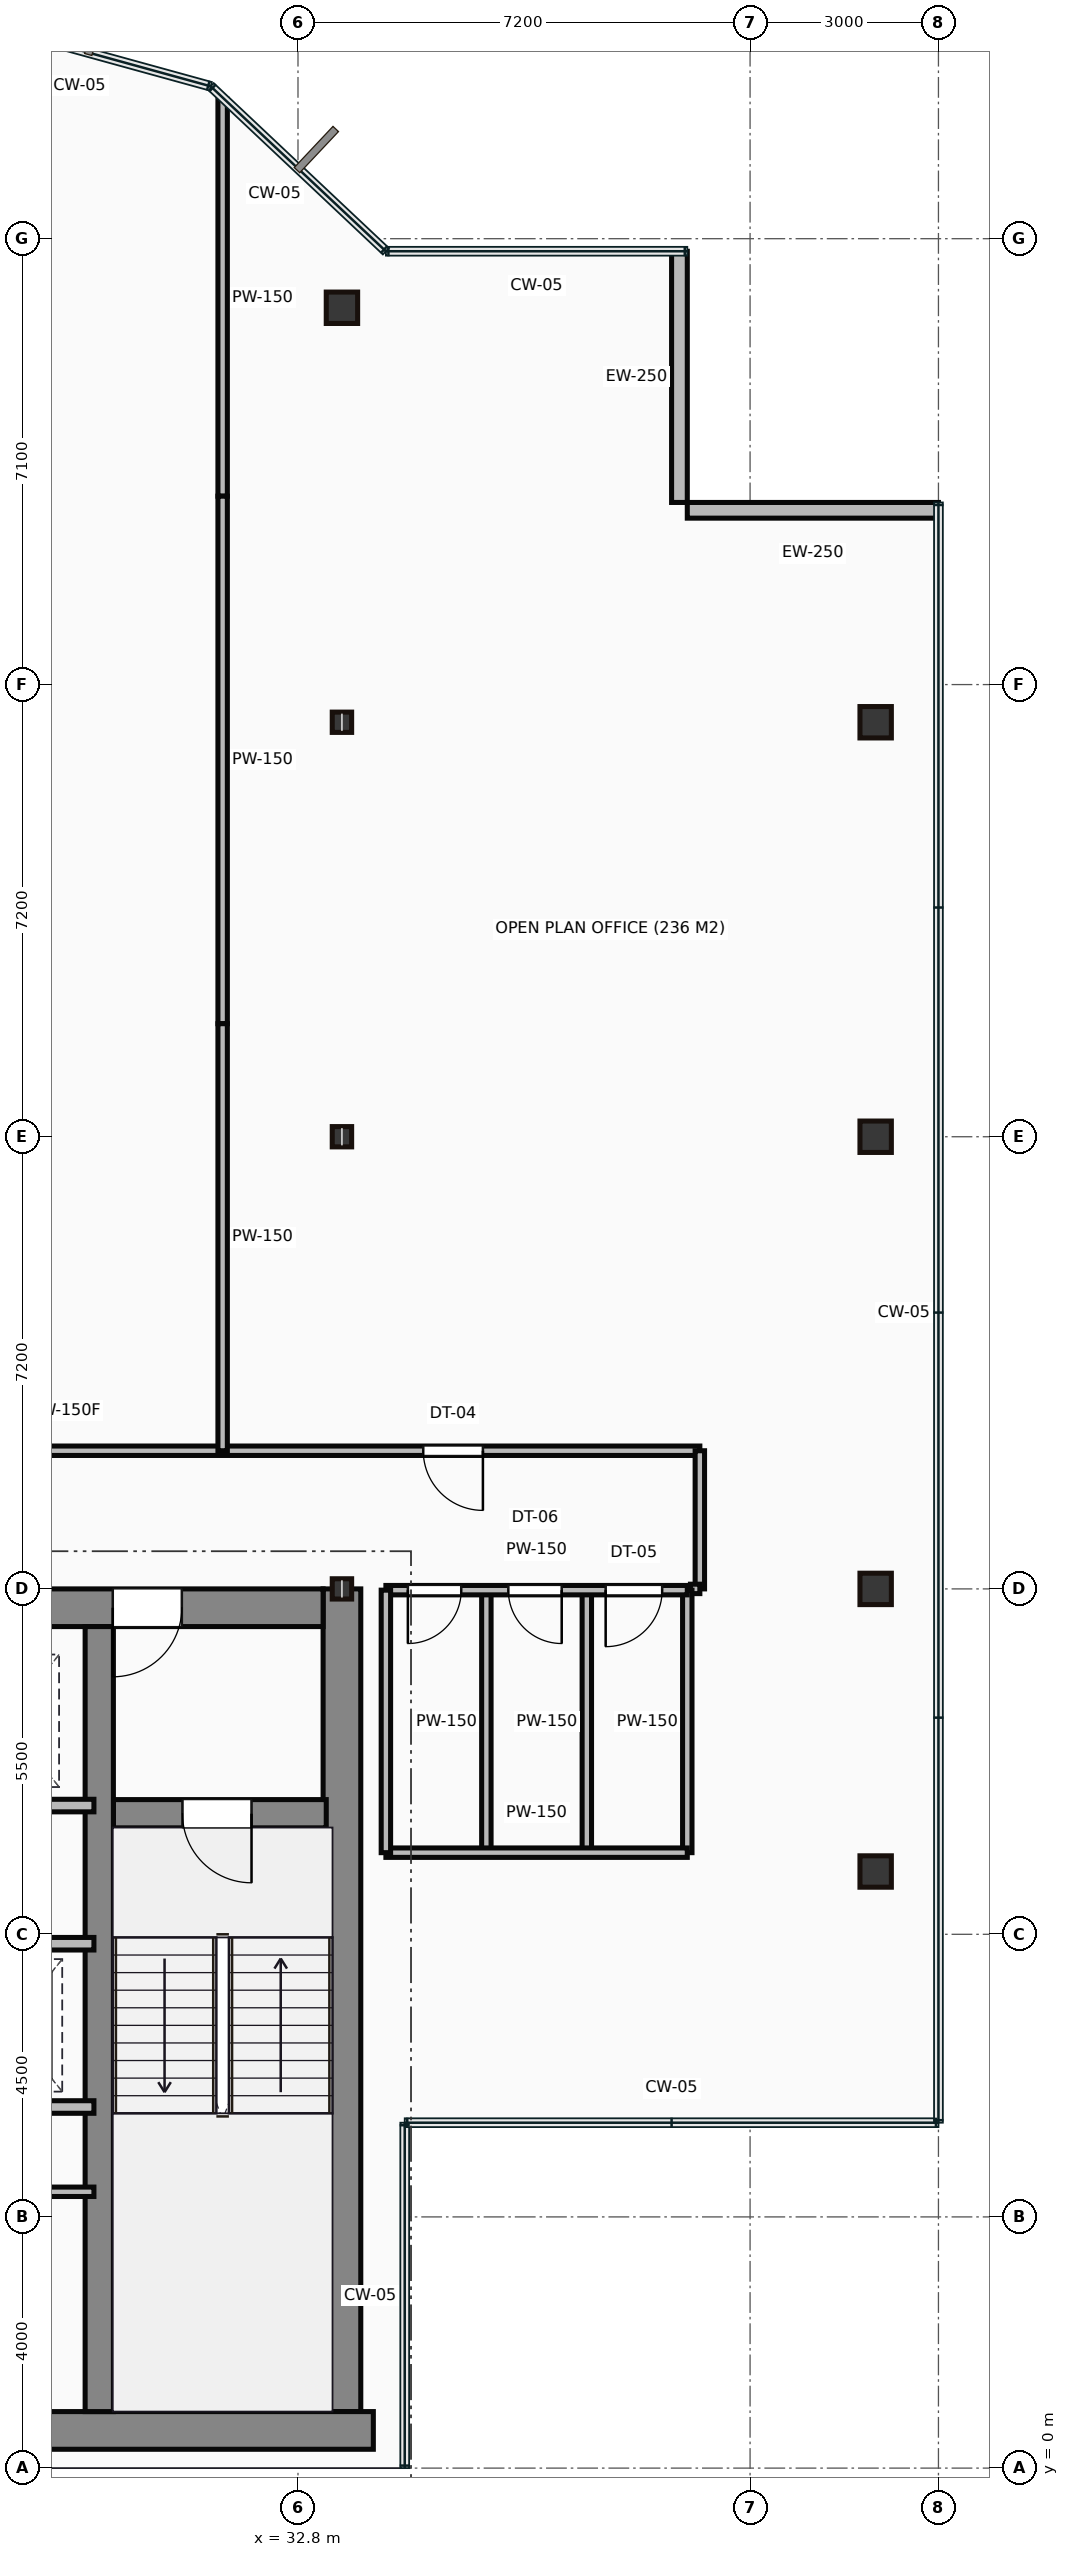
"""IFC4 building model, lengths in metres.
Left out: names, types, materials, properties, quantities, classifications, styles, units other than length and angle.
Written with IfcOpenShell. Run it as: python <this file> out.ifc"""

import sys

from ifc_helpers import new_model, si_unit, direction, frame, frame_2d, origin, origin_2d, place, context, subcontext, project, spatial, rectangle, hollow_rectangle, i_section, extrude, source, transform, mapped, element, fill, save


model = new_model("IFC4")
c1 = context("Model", 3, precision=1e-05, world=origin(), true_north=direction((0.0, 1.0)))
c2 = subcontext(c1, "Body", "Model", "MODEL_VIEW")
j1 = project(units=[si_unit("LENGTHUNIT", "METRE"), si_unit("PLANEANGLEUNIT", "RADIAN")], contexts=[c1])
p1 = place(None, origin())
s1 = spatial("IfcSite", under=j1, at=p1, CompositionType="ELEMENT")
p2 = place(p1, origin())
s2 = spatial("IfcBuilding", under=s1, at=p2, CompositionType="ELEMENT")
p3 = place(p2, frame((0.0, 0.0, 228.75)))
s3 = spatial("IfcBuildingStorey", under=s2, at=p3, CompositionType="ELEMENT", Elevation=228.75)
m1 = source(origin(), c2, "Body", "SweptSolid", [
    extrude(rectangle(XDim=29.5, YDim=0.6, at=frame_2d((14.75, 0.0))), origin(), (0.0, 0.0, 1.0), 3.65),
])
p4 = place(p3, frame((4.5, 0.6, 0.0), z_axis=(0.0, 0.0, 1.0), x_axis=(1.0, 0.0, 0.0)))
e1 = element("IfcWall", 1, at=p4, inside=s3, PredefinedType="SHEAR", context=c2, shape_type="MappedRepresentation", body=[
    mapped(m1, transform((0.0, 0.0, 0.0))),
])
m2 = source(origin(), c2, "Body", "SweptSolid", [
    extrude(rectangle(XDim=13.1, YDim=0.6, at=frame_2d((6.55, 0.0))), origin(), (0.0, 0.0, 1.0), 3.65),
])
p5 = place(p3, frame((33.5, 0.9, 0.0), z_axis=(0.0, 0.0, 1.0), x_axis=(0.0, 1.0, 0.0)))
e2 = element("IfcWall", 2, at=p5, inside=s3, PredefinedType="SHEAR", context=c2, shape_type="MappedRepresentation", body=[
    mapped(m2, transform((0.0, 0.0, 0.0))),
])
m3 = source(origin(), c2, "Body", "SweptSolid", [
    extrude(rectangle(XDim=12.6, YDim=0.6, at=frame_2d((6.3, 0.0))), origin(), (0.0, 0.0, 1.0), 3.65),
])
p6 = place(p3, frame((20.6, 13.7, 0.0), z_axis=(0.0, 0.0, 1.0), x_axis=(1.0, 0.0, 0.0)))
e3 = element("IfcWall", 3, at=p6, inside=s3, PredefinedType="SHEAR", context=c2, shape_type="MappedRepresentation", body=[
    mapped(m3, transform((0.0, 0.0, 0.0))),
])
p7 = place(p6, frame((9.25, 0.0, 0.0)))
e4 = element("IfcOpeningElement", 4, at=p7, cuts=e3, PredefinedType="OPENING", context=c2, shape_type="SweptSolid", body=[
    extrude(rectangle(XDim=1.1, YDim=2.15, at=frame_2d((0.55, 1.075))), frame((0.0, 0.31, 0.0), z_axis=(0.0, -1.0, 0.0), x_axis=(1.0, 0.0, 0.0)), (0.0, 0.0, 1.0), 0.62),
])
m4 = source(origin(), c2, "Body", "SweptSolid", [
    extrude(rectangle(XDim=12.5, YDim=0.45, at=frame_2d((6.25, 0.0))), origin(), (0.0, 0.0, 1.0), 3.65),
])
p8 = place(p3, frame((29.635, 0.9, 0.0), z_axis=(0.0, 0.0, 1.0), x_axis=(0.0, 1.0, 0.0)))
e5 = element("IfcWall", 5, at=p8, inside=s3, PredefinedType="SHEAR", context=c2, shape_type="MappedRepresentation", body=[
    mapped(m4, transform((0.0, 0.0, 0.0))),
])
m5 = source(origin(), c2, "Body", "SweptSolid", [
    extrude(rectangle(XDim=3.39, YDim=0.45, at=frame_2d((1.695, 0.0))), origin(), (0.0, 0.0, 1.0), 3.65),
])
p9 = place(p3, frame((29.86, 10.42, 0.0), z_axis=(0.0, 0.0, 1.0), x_axis=(1.0, 0.0, 0.0)))
e6 = element("IfcWall", 6, at=p9, inside=s3, PredefinedType="SHEAR", context=c2, shape_type="MappedRepresentation", body=[
    mapped(m5, transform((0.0, 0.0, 0.0))),
])
p10 = place(p9, frame((1.1, 0.0, 0.0)))
e7 = element("IfcOpeningElement", 7, at=p10, cuts=e6, PredefinedType="OPENING", context=c2, shape_type="SweptSolid", body=[
    extrude(rectangle(XDim=1.1, YDim=2.15, at=frame_2d((0.55, 1.075))), frame((0.0, 0.235, 0.0), z_axis=(0.0, -1.0, 0.0), x_axis=(1.0, 0.0, 0.0)), (0.0, 0.0, 1.0), 0.47),
])
m6 = source(origin(), c2, "Body", "SweptSolid", [
    extrude(i_section(OverallWidth=0.309, OverallDepth=0.323, WebThickness=0.014, FlangeThickness=0.023, at=origin_2d()), origin(), (0.0, 0.0, 1.0), 3.65),
])
for number, where, z_axis, x_axis in (
    (8, (33.5, 14.0, 0.0), (0.0, 0.0, 1.0), (1.0, 0.0, 0.0)),
    (9, (33.5, 21.2, 0.0), (0.0, 0.0, 1.0), (1.0, 0.0, 0.0)),
    (10, (33.5, 27.8, 0.0), (0.0, 0.0, 1.0), (1.0, 0.0, 0.0)),
):
    element("IfcColumn", number, at=place(p3, frame(where, z_axis=z_axis, x_axis=x_axis)), inside=s3, PredefinedType="COLUMN", context=c2, shape_type="MappedRepresentation", body=[
        mapped(m6, transform((0.0, 0.0, 0.0))),
    ])
m7 = source(origin(), c2, "Body", "SweptSolid", [
    extrude(hollow_rectangle(XDim=0.5, YDim=0.5, WallThickness=0.022, at=origin_2d()), origin(), (0.0, 0.0, 1.0), 3.65),
])
for number, where, z_axis, x_axis in (
    (11, (33.5, 34.4, 0.0), (0.0, 0.0, 1.0), (1.0, 0.0, 0.0)),
    (12, (42.0, 9.5, 0.0), (0.0, 0.0, 1.0), (1.0, 0.0, 0.0)),
    (13, (42.0, 14.0, 0.0), (0.0, 0.0, 1.0), (1.0, 0.0, 0.0)),
    (14, (42.0, 21.2, 0.0), (0.0, 0.0, 1.0), (1.0, 0.0, 0.0)),
    (15, (42.0, 27.8, 0.0), (0.0, 0.0, 1.0), (1.0, 0.0, 0.0)),
):
    element("IfcColumn", number, at=place(p3, frame(where, z_axis=z_axis, x_axis=x_axis)), inside=s3, PredefinedType="COLUMN", context=c2, shape_type="MappedRepresentation", body=[
        mapped(m7, transform((0.0, 0.0, 0.0))),
    ])
m8 = source(origin(), c2, "Body", "SweptSolid", [
    extrude(rectangle(XDim=4.0, YDim=0.25, at=frame_2d((2.0, 0.0))), origin(), (0.0, 0.0, 1.0), 3.4),
])
for number, where, z_axis, x_axis in (
    (16, (43.0, 31.175, 0.0), (0.0, 0.0, 1.0), (-1.0, 0.0, 0.0)),
    (17, (38.875, 31.3, 0.0), (0.0, 0.0, 1.0), (0.0, 1.0, 0.0)),
):
    element("IfcWall", number, at=place(p3, frame(where, z_axis=z_axis, x_axis=x_axis)), inside=s3, PredefinedType="STANDARD", context=c2, shape_type="MappedRepresentation", body=[
        mapped(m8, transform((0.0, 0.0, 0.0))),
    ])
m9 = source(origin(), c2, "Body", "SweptSolid", [
    extrude(rectangle(XDim=8.8, YDim=0.2, at=frame_2d((4.4, 0.0))), origin(), (0.0, 0.0, 1.0), 3.4),
])
p11 = place(p3, frame((20.75, 10.55, 0.0), z_axis=(0.0, 0.0, 1.0), x_axis=(1.0, 0.0, 0.0)))
e18 = element("IfcWall", 18, at=p11, inside=s3, PredefinedType="PARTITIONING", context=c2, shape_type="MappedRepresentation", body=[
    mapped(m9, transform((0.0, 0.0, 0.0))),
])
p12 = place(p11, frame((0.5, 0.0, 0.0)))
e19 = element("IfcOpeningElement", 19, at=p12, cuts=e18, PredefinedType="OPENING", context=c2, shape_type="SweptSolid", body=[
    extrude(rectangle(XDim=1.05, YDim=2.15, at=frame_2d((0.525, 1.075))), frame((0.0, 0.11, 0.0), z_axis=(0.0, -1.0, 0.0), x_axis=(1.0, 0.0, 0.0)), (0.0, 0.0, 1.0), 0.22),
])
p13 = place(p11, frame((2.6, 0.0, 0.0)))
e20 = element("IfcOpeningElement", 20, at=p13, cuts=e18, PredefinedType="OPENING", context=c2, shape_type="SweptSolid", body=[
    extrude(rectangle(XDim=1.05, YDim=2.15, at=frame_2d((0.525, 1.075))), frame((0.0, 0.11, 0.0), z_axis=(0.0, -1.0, 0.0), x_axis=(1.0, 0.0, 0.0)), (0.0, 0.0, 1.0), 0.22),
])
p14 = place(p11, frame((4.7, 0.0, 0.0)))
e21 = element("IfcOpeningElement", 21, at=p14, cuts=e18, PredefinedType="OPENING", context=c2, shape_type="SweptSolid", body=[
    extrude(rectangle(XDim=1.05, YDim=2.15, at=frame_2d((0.525, 1.075))), frame((0.0, 0.11, 0.0), z_axis=(0.0, -1.0, 0.0), x_axis=(1.0, 0.0, 0.0)), (0.0, 0.0, 1.0), 0.22),
])
p15 = place(p11, frame((6.8, 0.0, 0.0)))
e22 = element("IfcOpeningElement", 22, at=p15, cuts=e18, PredefinedType="OPENING", context=c2, shape_type="SweptSolid", body=[
    extrude(rectangle(XDim=1.05, YDim=2.15, at=frame_2d((0.525, 1.075))), frame((0.0, 0.11, 0.0), z_axis=(0.0, -1.0, 0.0), x_axis=(1.0, 0.0, 0.0)), (0.0, 0.0, 1.0), 0.22),
])
m10 = source(origin(), c2, "Body", "SweptSolid", [
    extrude(rectangle(XDim=4.55, YDim=0.2, at=frame_2d((2.275, 0.0))), origin(), (0.0, 0.0, 1.0), 3.4),
])
p16 = place(p3, frame((25.0, 8.35, 0.0), z_axis=(0.0, 0.0, 1.0), x_axis=(1.0, 0.0, 0.0)))
e23 = element("IfcWall", 23, at=p16, inside=s3, PredefinedType="PARTITIONING", context=c2, shape_type="MappedRepresentation", body=[
    mapped(m10, transform((0.0, 0.0, 0.0))),
])
p17 = place(p16, frame((0.5, 0.0, 0.0)))
e24 = element("IfcOpeningElement", 24, at=p17, cuts=e23, PredefinedType="OPENING", context=c2, shape_type="SweptSolid", body=[
    extrude(rectangle(XDim=1.05, YDim=2.15, at=frame_2d((0.525, 1.075))), frame((0.0, 0.11, 0.0), z_axis=(0.0, -1.0, 0.0), x_axis=(1.0, 0.0, 0.0)), (0.0, 0.0, 1.0), 0.22),
])
p18 = place(p16, frame((2.6, 0.0, 0.0)))
e25 = element("IfcOpeningElement", 25, at=p18, cuts=e23, PredefinedType="OPENING", context=c2, shape_type="SweptSolid", body=[
    extrude(rectangle(XDim=1.05, YDim=2.15, at=frame_2d((0.525, 1.075))), frame((0.0, 0.11, 0.0), z_axis=(0.0, -1.0, 0.0), x_axis=(1.0, 0.0, 0.0)), (0.0, 0.0, 1.0), 0.22),
])
p19 = place(p3, frame((25.0, 5.75, 0.0), z_axis=(0.0, 0.0, 1.0), x_axis=(1.0, 0.0, 0.0)))
e26 = element("IfcWall", 26, at=p19, inside=s3, PredefinedType="PARTITIONING", context=c2, shape_type="MappedRepresentation", body=[
    mapped(m10, transform((0.0, 0.0, 0.0))),
])
m11 = source(origin(), c2, "Body", "SweptSolid", [
    extrude(rectangle(XDim=4.55, YDim=0.15, at=frame_2d((2.275, 0.0))), origin(), (0.0, 0.0, 1.0), 3.4),
])
p20 = place(p3, frame((25.0, 4.4, 0.0), z_axis=(0.0, 0.0, 1.0), x_axis=(1.0, 0.0, 0.0)))
e27 = element("IfcWall", 27, at=p20, inside=s3, PredefinedType="PARTITIONING", context=c2, shape_type="MappedRepresentation", body=[
    mapped(m11, transform((0.0, 0.0, 0.0))),
])
m12 = source(origin(), c2, "Body", "SweptSolid", [
    extrude(rectangle(XDim=4.8, YDim=0.15, at=frame_2d((2.4, 0.0))), origin(), (0.0, 0.0, 1.0), 2.787),
])
p21 = place(p3, frame((34.2, 13.98, 0.0), z_axis=(0.0, 0.0, 1.0), x_axis=(1.0, 0.0, 0.0)))
e28 = element("IfcWall", 28, at=p21, inside=s3, PredefinedType="PARTITIONING", context=c2, shape_type="MappedRepresentation", body=[
    mapped(m12, transform((0.0, 0.0, 0.0))),
])
p22 = place(p21, frame((0.35, 0.0, 0.0)))
e29 = element("IfcOpeningElement", 29, at=p22, cuts=e28, PredefinedType="OPENING", context=c2, shape_type="SweptSolid", body=[
    extrude(rectangle(XDim=0.85, YDim=2.1, at=frame_2d((0.425, 1.05))), frame((0.0, 0.085, 0.0), z_axis=(0.0, -1.0, 0.0), x_axis=(1.0, 0.0, 0.0)), (0.0, 0.0, 1.0), 0.17),
])
p23 = place(p21, frame((1.95, 0.0, 0.0)))
e30 = element("IfcOpeningElement", 30, at=p23, cuts=e28, PredefinedType="OPENING", context=c2, shape_type="SweptSolid", body=[
    extrude(rectangle(XDim=0.85, YDim=2.1, at=frame_2d((0.425, 1.05))), frame((0.0, 0.085, 0.0), z_axis=(0.0, -1.0, 0.0), x_axis=(1.0, 0.0, 0.0)), (0.0, 0.0, 1.0), 0.17),
])
p24 = place(p21, frame((3.5, 0.0, 0.0)))
e31 = element("IfcOpeningElement", 31, at=p24, cuts=e28, PredefinedType="OPENING", context=c2, shape_type="SweptSolid", body=[
    extrude(rectangle(XDim=0.9, YDim=2.1, at=frame_2d((0.45, 1.05))), frame((0.0, 0.085, 0.0), z_axis=(0.0, -1.0, 0.0), x_axis=(1.0, 0.0, 0.0)), (0.0, 0.0, 1.0), 0.17),
])
m13 = source(origin(), c2, "Body", "SweptSolid", [
    extrude(rectangle(XDim=4.8, YDim=0.15, at=frame_2d((2.4, 0.0))), origin(), (0.0, 0.0, 1.0), 3.4),
])
p25 = place(p3, frame((34.2, 9.8, 0.0), z_axis=(0.0, 0.0, 1.0), x_axis=(1.0, 0.0, 0.0)))
e32 = element("IfcWall", 32, at=p25, inside=s3, PredefinedType="PARTITIONING", context=c2, shape_type="MappedRepresentation", body=[
    mapped(m13, transform((0.0, 0.0, 0.0))),
])
m14 = source(origin(), c2, "Body", "SweptSolid", [
    extrude(rectangle(XDim=4.18, YDim=0.15, at=frame_2d((2.09, 0.0))), origin(), (0.0, 0.0, 1.0), 3.4),
])
for number, where, z_axis, x_axis in (
    (33, (39.0, 9.8, 0.0), (0.0, 0.0, 1.0), (0.0, 1.0, 0.0)),
    (34, (34.2, 9.8, 0.0), (0.0, 0.0, 1.0), (0.0, 1.0, 0.0)),
    (35, (35.8, 9.8, 0.0), (0.0, 0.0, 1.0), (0.0, 1.0, 0.0)),
    (36, (37.4, 9.8, 0.0), (0.0, 0.0, 1.0), (0.0, 1.0, 0.0)),
):
    element("IfcWall", number, at=place(p3, frame(where, z_axis=z_axis, x_axis=x_axis)), inside=s3, PredefinedType="PARTITIONING", context=c2, shape_type="MappedRepresentation", body=[
        mapped(m14, transform((0.0, 0.0, 0.0))),
    ])
m15 = source(origin(), c2, "Body", "SweptSolid", [
    extrude(rectangle(XDim=20.2, YDim=0.15, at=frame_2d((10.1, 0.0))), origin(), (0.0, 0.0, 1.0), 3.4),
])
p26 = place(p3, frame((19.0, 16.2, 0.0), z_axis=(0.0, 0.0, 1.0), x_axis=(1.0, 0.0, 0.0)))
e37 = element("IfcWall", 37, at=p26, inside=s3, PredefinedType="PARTITIONING", context=c2, shape_type="MappedRepresentation", body=[
    mapped(m15, transform((0.0, 0.0, 0.0))),
])
p27 = place(p26, frame((5.955, 0.0, 0.0)))
e38 = element("IfcOpeningElement", 38, at=p27, cuts=e37, PredefinedType="OPENING", context=c2, shape_type="SweptSolid", body=[
    extrude(rectangle(XDim=0.95, YDim=2.15, at=frame_2d((0.475, 1.075))), frame((0.0, 0.085, 0.0), z_axis=(0.0, -1.0, 0.0), x_axis=(1.0, 0.0, 0.0)), (0.0, 0.0, 1.0), 0.17),
])
p28 = place(p26, frame((15.795, 0.0, 0.0)))
e39 = element("IfcOpeningElement", 39, at=p28, cuts=e37, PredefinedType="OPENING", context=c2, shape_type="SweptSolid", body=[
    extrude(rectangle(XDim=0.95, YDim=2.15, at=frame_2d((0.475, 1.075))), frame((0.0, 0.085, 0.0), z_axis=(0.0, -1.0, 0.0), x_axis=(1.0, 0.0, 0.0)), (0.0, 0.0, 1.0), 0.17),
])
m16 = source(origin(), c2, "Body", "SweptSolid", [
    extrude(rectangle(XDim=2.2, YDim=0.15, at=frame_2d((1.1, 0.0))), origin(), (0.0, 0.0, 1.0), 3.4),
])
p29 = place(p3, frame((39.2, 16.2, 0.0), z_axis=(0.0, 0.0, 1.0), x_axis=(0.0, -1.0, 0.0)))
e40 = element("IfcWall", 40, at=p29, inside=s3, PredefinedType="PARTITIONING", context=c2, shape_type="MappedRepresentation", body=[
    mapped(m16, transform((0.0, 0.0, 0.0))),
])
m17 = source(origin(), c2, "Body", "SweptSolid", [
    extrude(rectangle(XDim=0.15, YDim=0.15, at=frame_2d((0.075, 0.0))), origin(), (0.0, 0.0, 1.0), 3.4),
])
p30 = place(p3, frame((39.2, 14.0, 0.0), z_axis=(0.0, 0.0, 1.0), x_axis=(-1.0, 0.0, 0.0)))
e41 = element("IfcWall", 41, at=p30, inside=s3, PredefinedType="PARTITIONING", context=c2, shape_type="MappedRepresentation", body=[
    mapped(m17, transform((0.0, 0.0, 0.0))),
])
m18 = source(origin(), c2, "Body", "SweptSolid", [
    extrude(rectangle(XDim=6.32, YDim=0.15, at=frame_2d((3.16, 0.0))), origin(), (0.0, 0.0, 1.0), 3.4),
])
p31 = place(p3, frame((31.6, 37.72, 0.0), z_axis=(0.0, 0.0, 1.0), x_axis=(0.0, -1.0, 0.0)))
e42 = element("IfcWall", 42, at=p31, inside=s3, PredefinedType="PARTITIONING", context=c2, shape_type="MappedRepresentation", body=[
    mapped(m18, transform((0.0, 0.0, 0.0))),
])
m19 = source(origin(), c2, "Body", "SweptSolid", [
    extrude(rectangle(XDim=8.4, YDim=0.15, at=frame_2d((4.2, 0.0))), origin(), (0.0, 0.0, 1.0), 3.4),
])
p32 = place(p3, frame((31.6, 31.4, 0.0), z_axis=(0.0, 0.0, 1.0), x_axis=(0.0, -1.0, 0.0)))
e43 = element("IfcWall", 43, at=p32, inside=s3, PredefinedType="PARTITIONING", context=c2, shape_type="MappedRepresentation", body=[
    mapped(m19, transform((0.0, 0.0, 0.0))),
])
m20 = source(origin(), c2, "Body", "SweptSolid", [
    extrude(rectangle(XDim=6.8, YDim=0.15, at=frame_2d((3.4, 0.0))), origin(), (0.0, 0.0, 1.0), 3.4),
])
p33 = place(p3, frame((31.6, 23.0, 0.0), z_axis=(0.0, 0.0, 1.0), x_axis=(0.0, -1.0, 0.0)))
e44 = element("IfcWall", 44, at=p33, inside=s3, PredefinedType="PARTITIONING", context=c2, shape_type="MappedRepresentation", body=[
    mapped(m20, transform((0.0, 0.0, 0.0))),
])
m21 = source(origin(), c2, "Body", "SweptSolid", [
    extrude(rectangle(XDim=1.1, YDim=2.15, at=frame_2d((0.55, 1.075))), frame((0.0, 0.025, 0.0), z_axis=(0.0, -1.0, 0.0), x_axis=(1.0, 0.0, 0.0)), (0.0, 0.0, 1.0), 0.05),
])
p34 = place(p10, frame((1.1, 0.0, 0.0), z_axis=(0.0, 0.0, 1.0), x_axis=(-1.0, 0.0, 0.0)))
e45 = element("IfcDoor", 45, at=p34, inside=s3, OperationType="SINGLE_SWING_RIGHT", PredefinedType="DOOR", context=c2, shape_type="MappedRepresentation", body=[
    mapped(m21, transform((0.0, 0.0, 0.0))),
])
fill(e7, e45)
p35 = place(p7, origin())
e46 = element("IfcDoor", 46, at=p35, inside=s3, OperationType="SINGLE_SWING_LEFT", PredefinedType="DOOR", context=c2, shape_type="MappedRepresentation", body=[
    mapped(m21, transform((0.0, 0.0, 0.0))),
])
fill(e4, e46)
m22 = source(origin(), c2, "Body", "SweptSolid", [
    extrude(rectangle(XDim=0.85, YDim=2.1, at=frame_2d((0.425, 1.05))), frame((0.0, 0.025, 0.0), z_axis=(0.0, -1.0, 0.0), x_axis=(1.0, 0.0, 0.0)), (0.0, 0.0, 1.0), 0.05),
])
p36 = place(p22, frame((0.85, 0.0, 0.0), z_axis=(0.0, 0.0, 1.0), x_axis=(-1.0, 0.0, 0.0)))
e47 = element("IfcDoor", 47, at=p36, inside=s3, OperationType="SINGLE_SWING_LEFT", PredefinedType="DOOR", context=c2, shape_type="MappedRepresentation", body=[
    mapped(m22, transform((0.0, 0.0, 0.0))),
])
fill(e29, e47)
p37 = place(p23, frame((0.85, 0.0, 0.0), z_axis=(0.0, 0.0, 1.0), x_axis=(-1.0, 0.0, 0.0)))
e48 = element("IfcDoor", 48, at=p37, inside=s3, OperationType="SINGLE_SWING_RIGHT", PredefinedType="DOOR", context=c2, shape_type="MappedRepresentation", body=[
    mapped(m22, transform((0.0, 0.0, 0.0))),
])
fill(e30, e48)
m23 = source(origin(), c2, "Body", "SweptSolid", [
    extrude(rectangle(XDim=0.9, YDim=2.1, at=frame_2d((0.45, 1.05))), frame((0.0, 0.025, 0.0), z_axis=(0.0, -1.0, 0.0), x_axis=(1.0, 0.0, 0.0)), (0.0, 0.0, 1.0), 0.05),
])
p38 = place(p24, frame((0.9, 0.0, 0.0), z_axis=(0.0, 0.0, 1.0), x_axis=(-1.0, 0.0, 0.0)))
e49 = element("IfcDoor", 49, at=p38, inside=s3, OperationType="SINGLE_SWING_LEFT", PredefinedType="DOOR", context=c2, shape_type="MappedRepresentation", body=[
    mapped(m23, transform((0.0, 0.0, 0.0))),
])
fill(e31, e49)
m24 = source(origin(), c2, "Body", "SweptSolid", [
    extrude(rectangle(XDim=0.95, YDim=2.15, at=frame_2d((0.475, 1.075))), frame((0.0, 0.025, 0.0), z_axis=(0.0, -1.0, 0.0), x_axis=(1.0, 0.0, 0.0)), (0.0, 0.0, 1.0), 0.05),
])
p39 = place(p28, origin())
e50 = element("IfcDoor", 50, at=p39, inside=s3, OperationType="SINGLE_SWING_RIGHT", PredefinedType="DOOR", context=c2, shape_type="MappedRepresentation", body=[
    mapped(m24, transform((0.0, 0.0, 0.0))),
])
fill(e39, e50)
save(model, sys.argv[1])
